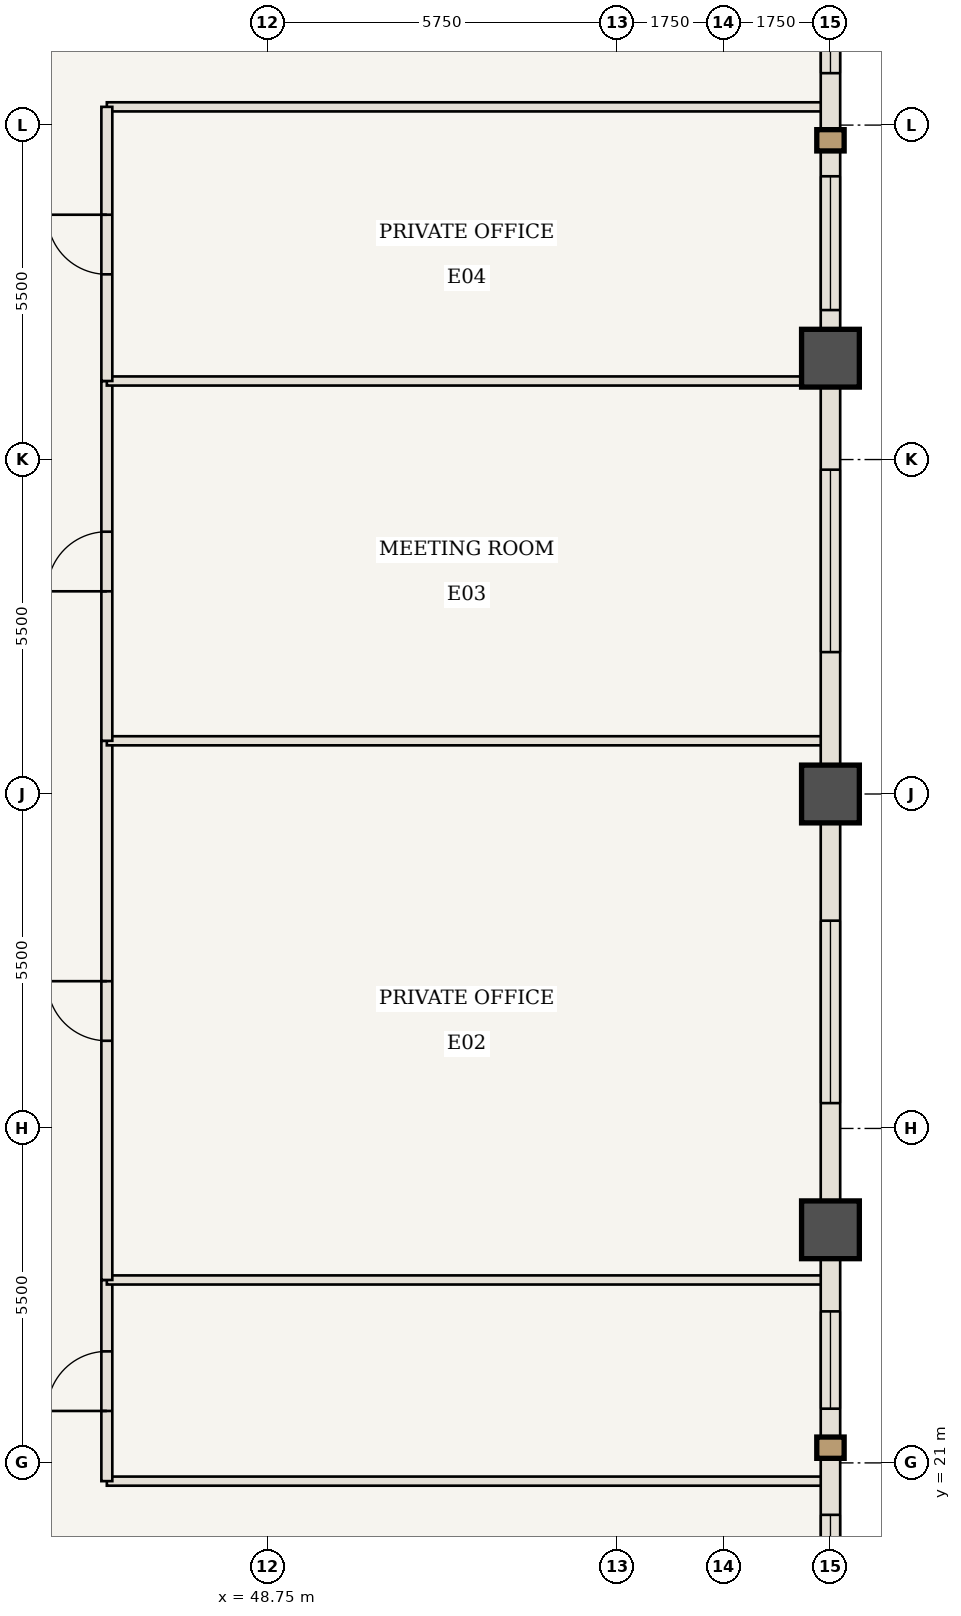
"""IFC4 building model, lengths in metres.
Left out: names, types, materials, properties, quantities, classifications, styles, units other than length and angle.
Written with IfcOpenShell. Run it as: python <this file> out.ifc"""

import sys

from ifc_helpers import new_model, si_unit, direction, frame, frame_2d, origin, origin_2d, place, context, subcontext, project, spatial, rectangle, extrude, element, fill, save


model = new_model("IFC4")
c1 = context("Model", 3, precision=1e-05, world=origin(), true_north=direction((0.0, 1.0)))
c2 = subcontext(c1, "Body", "Model", "MODEL_VIEW")
j1 = project(units=[si_unit("LENGTHUNIT", "METRE"), si_unit("PLANEANGLEUNIT", "RADIAN")], contexts=[c1])
p1 = place(None, origin())
s1 = spatial("IfcSite", under=j1, at=p1, CompositionType="ELEMENT")
p2 = place(p1, origin())
s2 = spatial("IfcBuilding", under=s1, at=p2, CompositionType="ELEMENT")
p3 = place(p2, frame((0.0, 0.0, 145.25)))
s3 = spatial("IfcBuildingStorey", under=s2, at=p3, CompositionType="ELEMENT", Elevation=145.25)
for number, where, z_axis, x_axis in (
    (1, (58.0, 24.833, 0.0), (0.0, 0.0, 1.0), (1.0, 0.0, 0.0)),
    (2, (58.0, 32.0, 0.0), (0.0, 0.0, 1.0), (1.0, 0.0, 0.0)),
    (3, (58.0, 39.167, 0.0), (0.0, 0.0, 1.0), (1.0, 0.0, 0.0)),
):
    element("IfcColumn", number, at=place(p3, frame(where, z_axis=z_axis, x_axis=x_axis)), inside=s3, PredefinedType="COLUMN", context=c2, shape_type="SweptSolid", body=[
        extrude(rectangle(XDim=0.95, YDim=0.95, at=origin_2d()), origin(), (0.0, 0.0, 1.0), 3.85),
    ])
for number, where, z_axis, x_axis in (
    (4, (46.1, 20.7, 0.0), (0.0, 0.0, 1.0), (1.0, 0.0, 0.0)),
    (5, (46.1, 43.3, 0.0), (0.0, 0.0, 1.0), (1.0, 0.0, 0.0)),
):
    element("IfcWall", number, at=place(p3, frame(where, z_axis=z_axis, x_axis=x_axis)), inside=s3, PredefinedType="STANDARD", context=c2, shape_type="SweptSolid", body=[
        extrude(rectangle(XDim=11.84, YDim=0.15, at=frame_2d((5.92, 0.0))), origin(), (0.0, 0.0, 1.0), 3.056),
    ])
p4 = place(p3, frame((46.1, 20.7, 0.0), z_axis=(0.0, 0.0, 1.0), x_axis=(0.0, 1.0, 0.0)))
e6 = element("IfcWall", 6, at=p4, inside=s3, PredefinedType="STANDARD", context=c2, shape_type="SweptSolid", body=[
    extrude(rectangle(XDim=3.308, YDim=0.18, at=frame_2d((1.654, 0.0))), origin(), (0.0, 0.0, 1.0), 3.685),
])
p5 = place(p4, frame((1.154, 0.0, 0.0)))
e7 = element("IfcOpeningElement", 7, at=p5, cuts=e6, PredefinedType="OPENING", context=c2, shape_type="SweptSolid", body=[
    extrude(rectangle(XDim=0.98, YDim=2.2, at=frame_2d((0.49, 1.1))), frame((0.0, 0.1, 0.0), z_axis=(0.0, -1.0, 0.0), x_axis=(1.0, 0.0, 0.0)), (0.0, 0.0, 1.0), 0.2),
])
p6 = place(p3, frame((46.1, 24.008, 0.0), z_axis=(0.0, 0.0, 1.0), x_axis=(1.0, 0.0, 0.0)))
e8 = element("IfcWall", 8, at=p6, inside=s3, PredefinedType="STANDARD", context=c2, shape_type="SweptSolid", body=[
    extrude(rectangle(XDim=11.84, YDim=0.15, at=frame_2d((5.92, 0.0))), origin(), (0.0, 0.0, 1.0), 3.685),
])
p7 = place(p3, frame((46.1, 24.008, 0.0), z_axis=(0.0, 0.0, 1.0), x_axis=(0.0, 1.0, 0.0)))
e9 = element("IfcWall", 9, at=p7, inside=s3, PredefinedType="STANDARD", context=c2, shape_type="SweptSolid", body=[
    extrude(rectangle(XDim=8.867, YDim=0.18, at=frame_2d((4.433, 0.0))), origin(), (0.0, 0.0, 1.0), 3.685),
])
p8 = place(p7, frame((3.933, 0.0, 0.0)))
e10 = element("IfcOpeningElement", 10, at=p8, cuts=e9, PredefinedType="OPENING", context=c2, shape_type="SweptSolid", body=[
    extrude(rectangle(XDim=0.98, YDim=2.2, at=frame_2d((0.49, 1.1))), frame((0.0, 0.1, 0.0), z_axis=(0.0, -1.0, 0.0), x_axis=(1.0, 0.0, 0.0)), (0.0, 0.0, 1.0), 0.2),
])
p9 = place(p3, frame((46.1, 32.875, 0.0), z_axis=(0.0, 0.0, 1.0), x_axis=(1.0, 0.0, 0.0)))
e11 = element("IfcWall", 11, at=p9, inside=s3, PredefinedType="STANDARD", context=c2, shape_type="SweptSolid", body=[
    extrude(rectangle(XDim=11.84, YDim=0.15, at=frame_2d((5.92, 0.0))), origin(), (0.0, 0.0, 1.0), 3.685),
])
p10 = place(p3, frame((46.1, 32.875, 0.0), z_axis=(0.0, 0.0, 1.0), x_axis=(0.0, 1.0, 0.0)))
e12 = element("IfcWall", 12, at=p10, inside=s3, PredefinedType="STANDARD", context=c2, shape_type="SweptSolid", body=[
    extrude(rectangle(XDim=5.917, YDim=0.18, at=frame_2d((2.958, 0.0))), origin(), (0.0, 0.0, 1.0), 3.685),
])
p11 = place(p10, frame((2.458, 0.0, 0.0)))
e13 = element("IfcOpeningElement", 13, at=p11, cuts=e12, PredefinedType="OPENING", context=c2, shape_type="SweptSolid", body=[
    extrude(rectangle(XDim=0.98, YDim=2.2, at=frame_2d((0.49, 1.1))), frame((0.0, 0.1, 0.0), z_axis=(0.0, -1.0, 0.0), x_axis=(1.0, 0.0, 0.0)), (0.0, 0.0, 1.0), 0.2),
])
p12 = place(p3, frame((46.1, 38.792, 0.0), z_axis=(0.0, 0.0, 1.0), x_axis=(1.0, 0.0, 0.0)))
e14 = element("IfcWall", 14, at=p12, inside=s3, PredefinedType="STANDARD", context=c2, shape_type="SweptSolid", body=[
    extrude(rectangle(XDim=11.84, YDim=0.15, at=frame_2d((5.92, 0.0))), origin(), (0.0, 0.0, 1.0), 3.685),
])
p13 = place(p3, frame((46.1, 38.792, 0.0), z_axis=(0.0, 0.0, 1.0), x_axis=(0.0, 1.0, 0.0)))
e15 = element("IfcWall", 15, at=p13, inside=s3, PredefinedType="STANDARD", context=c2, shape_type="SweptSolid", body=[
    extrude(rectangle(XDim=4.508, YDim=0.18, at=frame_2d((2.254, 0.0))), origin(), (0.0, 0.0, 1.0), 3.685),
])
p14 = place(p13, frame((1.754, 0.0, 0.0)))
e16 = element("IfcOpeningElement", 16, at=p14, cuts=e15, PredefinedType="OPENING", context=c2, shape_type="SweptSolid", body=[
    extrude(rectangle(XDim=0.98, YDim=2.2, at=frame_2d((0.49, 1.1))), frame((0.0, 0.1, 0.0), z_axis=(0.0, -1.0, 0.0), x_axis=(1.0, 0.0, 0.0)), (0.0, 0.0, 1.0), 0.2),
])
p15 = place(p3, frame((58.0, 24.833, 0.0), z_axis=(0.0, 0.0, 1.0), x_axis=(0.0, -1.0, 0.0)))
e17 = element("IfcWall", 17, at=p15, inside=s3, PredefinedType="USERDEFINED", context=c2, shape_type="SweptSolid", body=[
    extrude(rectangle(XDim=7.167, YDim=0.32, at=frame_2d((3.583, 0.0))), origin(), (0.0, 0.0, 1.0), 2.885),
])
p16 = place(p15, frame((1.342, 0.0, 0.85)))
e18 = element("IfcOpeningElement", 18, at=p16, cuts=e17, PredefinedType="OPENING", context=c2, shape_type="SweptSolid", body=[
    extrude(rectangle(XDim=1.6, YDim=1.835, at=frame_2d((0.8, 0.917))), frame((0.0, 0.17, 0.0), z_axis=(0.0, -1.0, 0.0), x_axis=(1.0, 0.0, 0.0)), (0.0, 0.0, 1.0), 0.34),
])
p17 = place(p15, frame((4.688, 0.0, 0.85)))
e19 = element("IfcOpeningElement", 19, at=p17, cuts=e17, PredefinedType="OPENING", context=c2, shape_type="SweptSolid", body=[
    extrude(rectangle(XDim=1.6, YDim=1.835, at=frame_2d((0.8, 0.917))), frame((0.0, 0.17, 0.0), z_axis=(0.0, -1.0, 0.0), x_axis=(1.0, 0.0, 0.0)), (0.0, 0.0, 1.0), 0.34),
])
p18 = place(p3, frame((58.0, 32.0, 0.0), z_axis=(0.0, 0.0, 1.0), x_axis=(0.0, -1.0, 0.0)))
e20 = element("IfcWall", 20, at=p18, inside=s3, PredefinedType="USERDEFINED", context=c2, shape_type="SweptSolid", body=[
    extrude(rectangle(XDim=7.167, YDim=0.32, at=frame_2d((3.583, 0.0))), origin(), (0.0, 0.0, 1.0), 2.885),
])
p19 = place(p18, frame((2.083, 0.0, 0.85)))
e21 = element("IfcOpeningElement", 21, at=p19, cuts=e20, PredefinedType="OPENING", context=c2, shape_type="SweptSolid", body=[
    extrude(rectangle(XDim=3.0, YDim=1.835, at=frame_2d((1.5, 0.917))), frame((0.0, 0.17, 0.0), z_axis=(0.0, -1.0, 0.0), x_axis=(1.0, 0.0, 0.0)), (0.0, 0.0, 1.0), 0.34),
])
p20 = place(p3, frame((58.0, 39.167, 0.0), z_axis=(0.0, 0.0, 1.0), x_axis=(0.0, -1.0, 0.0)))
e22 = element("IfcWall", 22, at=p20, inside=s3, PredefinedType="USERDEFINED", context=c2, shape_type="SweptSolid", body=[
    extrude(rectangle(XDim=7.167, YDim=0.32, at=frame_2d((3.583, 0.0))), origin(), (0.0, 0.0, 1.0), 2.885),
])
p21 = place(p20, frame((1.833, 0.0, 0.85)))
e23 = element("IfcOpeningElement", 23, at=p21, cuts=e22, PredefinedType="OPENING", context=c2, shape_type="SweptSolid", body=[
    extrude(rectangle(XDim=3.0, YDim=1.835, at=frame_2d((1.5, 0.917))), frame((0.0, 0.17, 0.0), z_axis=(0.0, -1.0, 0.0), x_axis=(1.0, 0.0, 0.0)), (0.0, 0.0, 1.0), 0.34),
])
p22 = place(p3, frame((58.0, 46.333, 0.0), z_axis=(0.0, 0.0, 1.0), x_axis=(0.0, -1.0, 0.0)))
e24 = element("IfcWall", 24, at=p22, inside=s3, PredefinedType="USERDEFINED", context=c2, shape_type="SweptSolid", body=[
    extrude(rectangle(XDim=7.167, YDim=0.32, at=frame_2d((3.583, 0.0))), origin(), (0.0, 0.0, 1.0), 2.885),
])
p23 = place(p22, frame((0.879, 0.0, 0.85)))
e25 = element("IfcOpeningElement", 25, at=p23, cuts=e24, PredefinedType="OPENING", context=c2, shape_type="SweptSolid", body=[
    extrude(rectangle(XDim=1.6, YDim=1.835, at=frame_2d((0.8, 0.917))), frame((0.0, 0.17, 0.0), z_axis=(0.0, -1.0, 0.0), x_axis=(1.0, 0.0, 0.0)), (0.0, 0.0, 1.0), 0.34),
])
p24 = place(p22, frame((4.175, 0.0, 0.85)))
e26 = element("IfcOpeningElement", 26, at=p24, cuts=e24, PredefinedType="OPENING", context=c2, shape_type="SweptSolid", body=[
    extrude(rectangle(XDim=2.2, YDim=1.835, at=frame_2d((1.1, 0.917))), frame((0.0, 0.17, 0.0), z_axis=(0.0, -1.0, 0.0), x_axis=(1.0, 0.0, 0.0)), (0.0, 0.0, 1.0), 0.34),
])
p25 = place(p5, origin())
e27 = element("IfcDoor", 27, at=p25, inside=s3, OperationType="SINGLE_SWING_LEFT", PredefinedType="DOOR", context=c2, shape_type="SweptSolid", body=[
    extrude(rectangle(XDim=0.98, YDim=2.2, at=frame_2d((0.49, 1.1))), frame((0.0, 0.025, 0.0), z_axis=(0.0, -1.0, 0.0), x_axis=(1.0, 0.0, 0.0)), (0.0, 0.0, 1.0), 0.05),
])
fill(e7, e27)
p26 = place(p8, origin())
e28 = element("IfcDoor", 28, at=p26, inside=s3, OperationType="SINGLE_SWING_RIGHT", PredefinedType="DOOR", context=c2, shape_type="SweptSolid", body=[
    extrude(rectangle(XDim=0.98, YDim=2.2, at=frame_2d((0.49, 1.1))), frame((0.0, 0.025, 0.0), z_axis=(0.0, -1.0, 0.0), x_axis=(1.0, 0.0, 0.0)), (0.0, 0.0, 1.0), 0.05),
])
fill(e10, e28)
p27 = place(p11, origin())
e29 = element("IfcDoor", 29, at=p27, inside=s3, OperationType="SINGLE_SWING_LEFT", PredefinedType="DOOR", context=c2, shape_type="SweptSolid", body=[
    extrude(rectangle(XDim=0.98, YDim=2.2, at=frame_2d((0.49, 1.1))), frame((0.0, 0.025, 0.0), z_axis=(0.0, -1.0, 0.0), x_axis=(1.0, 0.0, 0.0)), (0.0, 0.0, 1.0), 0.05),
])
fill(e13, e29)
p28 = place(p14, origin())
e30 = element("IfcDoor", 30, at=p28, inside=s3, OperationType="SINGLE_SWING_RIGHT", PredefinedType="DOOR", context=c2, shape_type="SweptSolid", body=[
    extrude(rectangle(XDim=0.98, YDim=2.2, at=frame_2d((0.49, 1.1))), frame((0.0, 0.025, 0.0), z_axis=(0.0, -1.0, 0.0), x_axis=(1.0, 0.0, 0.0)), (0.0, 0.0, 1.0), 0.05),
])
fill(e16, e30)
p29 = place(p16, origin())
e31 = element("IfcWindow", 31, at=p29, inside=s3, PartitioningType="SINGLE_PANEL", PredefinedType="WINDOW", context=c2, shape_type="SweptSolid", body=[
    extrude(rectangle(XDim=1.6, YDim=1.835, at=frame_2d((0.8, 0.917))), frame((0.0, 0.03, 0.0), z_axis=(0.0, -1.0, 0.0), x_axis=(1.0, 0.0, 0.0)), (0.0, 0.0, 1.0), 0.06),
])
fill(e18, e31)
p30 = place(p17, origin())
e32 = element("IfcWindow", 32, at=p30, inside=s3, PartitioningType="SINGLE_PANEL", PredefinedType="WINDOW", context=c2, shape_type="SweptSolid", body=[
    extrude(rectangle(XDim=1.6, YDim=1.835, at=frame_2d((0.8, 0.917))), frame((0.0, 0.03, 0.0), z_axis=(0.0, -1.0, 0.0), x_axis=(1.0, 0.0, 0.0)), (0.0, 0.0, 1.0), 0.06),
])
fill(e19, e32)
p31 = place(p19, origin())
e33 = element("IfcWindow", 33, at=p31, inside=s3, PartitioningType="SINGLE_PANEL", PredefinedType="WINDOW", context=c2, shape_type="SweptSolid", body=[
    extrude(rectangle(XDim=3.0, YDim=1.835, at=frame_2d((1.5, 0.917))), frame((0.0, 0.03, 0.0), z_axis=(0.0, -1.0, 0.0), x_axis=(1.0, 0.0, 0.0)), (0.0, 0.0, 1.0), 0.06),
])
fill(e21, e33)
p32 = place(p21, origin())
e34 = element("IfcWindow", 34, at=p32, inside=s3, PartitioningType="SINGLE_PANEL", PredefinedType="WINDOW", context=c2, shape_type="SweptSolid", body=[
    extrude(rectangle(XDim=3.0, YDim=1.835, at=frame_2d((1.5, 0.917))), frame((0.0, 0.03, 0.0), z_axis=(0.0, -1.0, 0.0), x_axis=(1.0, 0.0, 0.0)), (0.0, 0.0, 1.0), 0.06),
])
fill(e23, e34)
p33 = place(p23, origin())
e35 = element("IfcWindow", 35, at=p33, inside=s3, PartitioningType="SINGLE_PANEL", PredefinedType="WINDOW", context=c2, shape_type="SweptSolid", body=[
    extrude(rectangle(XDim=1.6, YDim=1.835, at=frame_2d((0.8, 0.917))), frame((0.0, 0.03, 0.0), z_axis=(0.0, -1.0, 0.0), x_axis=(1.0, 0.0, 0.0)), (0.0, 0.0, 1.0), 0.06),
])
fill(e25, e35)
p34 = place(p24, origin())
e36 = element("IfcWindow", 36, at=p34, inside=s3, PartitioningType="SINGLE_PANEL", PredefinedType="WINDOW", context=c2, shape_type="SweptSolid", body=[
    extrude(rectangle(XDim=2.2, YDim=1.835, at=frame_2d((1.1, 0.917))), frame((0.0, 0.03, 0.0), z_axis=(0.0, -1.0, 0.0), x_axis=(1.0, 0.0, 0.0)), (0.0, 0.0, 1.0), 0.06),
])
fill(e26, e36)
save(model, sys.argv[1])
